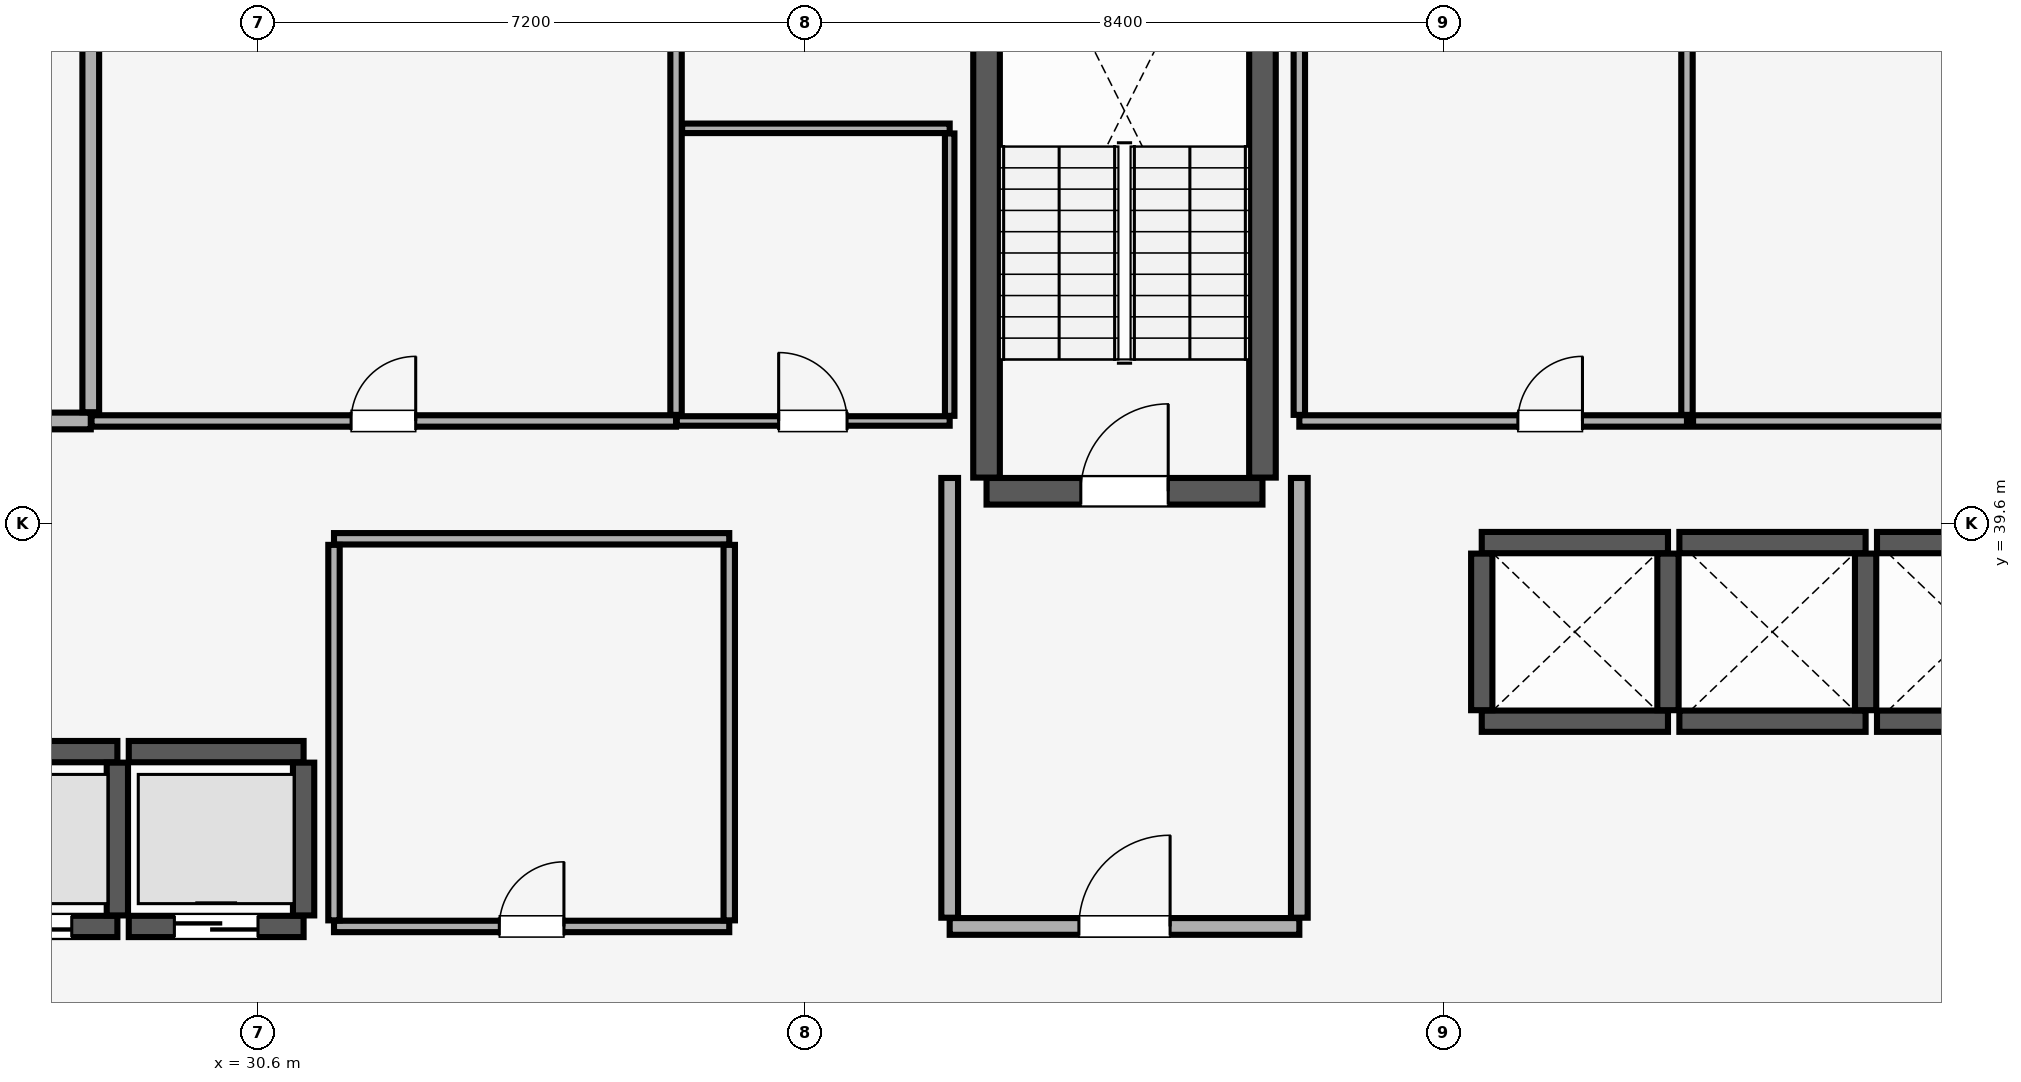
"""IFC4 building model, lengths in metres.
Left out: names, types, materials, properties, quantities, classifications, styles, units other than length and angle.
Written with IfcOpenShell. Run it as: python <this file> out.ifc"""

import sys

from ifc_helpers import new_model, si_unit, direction, frame, frame_2d, origin, place, context, subcontext, project, spatial, rectangle, extrude, element, fill, save


model = new_model("IFC4")
c1 = context("Model", 3, precision=1e-05, world=origin(), true_north=direction((0.0, 1.0)))
c2 = subcontext(c1, "Body", "Model", "MODEL_VIEW")
j1 = project(units=[si_unit("LENGTHUNIT", "METRE"), si_unit("PLANEANGLEUNIT", "RADIAN")], contexts=[c1])
p1 = place(None, origin())
s1 = spatial("IfcSite", under=j1, at=p1, CompositionType="ELEMENT")
p2 = place(p1, origin())
s2 = spatial("IfcBuilding", under=s1, at=p2, CompositionType="ELEMENT")
p3 = place(p2, frame((0.0, 0.0, 93.05)))
s3 = spatial("IfcBuildingStorey", under=s2, at=p3, CompositionType="ELEMENT", Elevation=93.05)
p4 = place(p3, frame((40.185, 40.025, 0.0), z_axis=(0.0, 0.0, 1.0), x_axis=(1.0, 0.0, 0.0)))
e1 = element("IfcWall", 1, at=p4, inside=s3, PredefinedType="SHEAR", context=c2, shape_type="SweptSolid", body=[
    extrude(rectangle(XDim=3.63, YDim=0.35, at=frame_2d((1.815, 0.0))), origin(), (0.0, 0.0, 1.0), 3.51),
])
p5 = place(p4, frame((1.24, 0.0, 0.0)))
e2 = element("IfcOpeningElement", 2, at=p5, cuts=e1, PredefinedType="OPENING", context=c2, shape_type="SweptSolid", body=[
    extrude(rectangle(XDim=1.15, YDim=2.15, at=frame_2d((0.575, 1.075))), frame((0.0, 0.185, 0.0), z_axis=(0.0, -1.0, 0.0), x_axis=(1.0, 0.0, 0.0)), (0.0, 0.0, 1.0), 0.37),
])
for number, where, z_axis, x_axis in (
    (3, (40.185, 40.205, 0.0), (0.0, 0.0, 1.0), (0.0, 1.0, 0.0)),
    (4, (43.815, 40.205, 0.0), (0.0, 0.0, 1.0), (0.0, 1.0, 0.0)),
):
    element("IfcWall", number, at=place(p3, frame(where, z_axis=z_axis, x_axis=x_axis)), inside=s3, PredefinedType="SHEAR", context=c2, shape_type="SweptSolid", body=[
        extrude(rectangle(XDim=8.09, YDim=0.35, at=frame_2d((4.045, 0.0))), origin(), (0.0, 0.0, 1.0), 3.51),
    ])
p6 = place(p3, frame((26.45, 34.3, 0.0), z_axis=(0.0, 0.0, 1.0), x_axis=(1.0, 0.0, 0.0)))
e5 = element("IfcWall", 5, at=p6, inside=s3, PredefinedType="SHEAR", context=c2, shape_type="SweptSolid", body=[
    extrude(rectangle(XDim=2.3, YDim=0.28, at=frame_2d((1.15, 0.0))), origin(), (0.0, 0.0, 1.0), 3.51),
])
p7 = place(p6, frame((0.6, 0.0, 0.0)))
e6 = element("IfcOpeningElement", 6, at=p7, cuts=e5, PredefinedType="OPENING", context=c2, shape_type="SweptSolid", body=[
    extrude(rectangle(XDim=1.1, YDim=2.2, at=frame_2d((0.55, 1.1))), frame((0.0, 0.15, 0.0), z_axis=(0.0, -1.0, 0.0), x_axis=(1.0, 0.0, 0.0)), (0.0, 0.0, 1.0), 0.3),
])
p8 = place(p3, frame((26.45, 36.6, 0.0), z_axis=(0.0, 0.0, 1.0), x_axis=(1.0, 0.0, 0.0)))
e7 = element("IfcWall", 7, at=p8, inside=s3, PredefinedType="SHEAR", context=c2, shape_type="SweptSolid", body=[
    extrude(rectangle(XDim=2.3, YDim=0.28, at=frame_2d((1.15, 0.0))), origin(), (0.0, 0.0, 1.0), 3.51),
])
p9 = place(p3, frame((28.75, 34.445, 0.0), z_axis=(0.0, 0.0, 1.0), x_axis=(0.0, 1.0, 0.0)))
e8 = element("IfcWall", 8, at=p9, inside=s3, PredefinedType="SHEAR", context=c2, shape_type="SweptSolid", body=[
    extrude(rectangle(XDim=2.01, YDim=0.28, at=frame_2d((1.005, 0.0))), origin(), (0.0, 0.0, 1.0), 3.51),
])
p10 = place(p3, frame((28.9, 34.3, 0.0), z_axis=(0.0, 0.0, 1.0), x_axis=(1.0, 0.0, 0.0)))
e9 = element("IfcWall", 9, at=p10, inside=s3, PredefinedType="SHEAR", context=c2, shape_type="SweptSolid", body=[
    extrude(rectangle(XDim=2.3, YDim=0.28, at=frame_2d((1.15, 0.0))), origin(), (0.0, 0.0, 1.0), 3.51),
])
p11 = place(p10, frame((0.6, 0.0, 0.0)))
e10 = element("IfcOpeningElement", 10, at=p11, cuts=e9, PredefinedType="OPENING", context=c2, shape_type="SweptSolid", body=[
    extrude(rectangle(XDim=1.1, YDim=2.2, at=frame_2d((0.55, 1.1))), frame((0.0, 0.15, 0.0), z_axis=(0.0, -1.0, 0.0), x_axis=(1.0, 0.0, 0.0)), (0.0, 0.0, 1.0), 0.3),
])
p12 = place(p3, frame((28.9, 36.6, 0.0), z_axis=(0.0, 0.0, 1.0), x_axis=(1.0, 0.0, 0.0)))
e11 = element("IfcWall", 11, at=p12, inside=s3, PredefinedType="SHEAR", context=c2, shape_type="SweptSolid", body=[
    extrude(rectangle(XDim=2.3, YDim=0.28, at=frame_2d((1.15, 0.0))), origin(), (0.0, 0.0, 1.0), 3.51),
])
p13 = place(p3, frame((31.2, 34.445, 0.0), z_axis=(0.0, 0.0, 1.0), x_axis=(0.0, 1.0, 0.0)))
e12 = element("IfcWall", 12, at=p13, inside=s3, PredefinedType="SHEAR", context=c2, shape_type="SweptSolid", body=[
    extrude(rectangle(XDim=2.01, YDim=0.28, at=frame_2d((1.005, 0.0))), origin(), (0.0, 0.0, 1.0), 3.51),
])
for number, where, z_axis, x_axis in (
    (13, (46.7, 37.0, 0.0), (0.0, 0.0, 1.0), (1.0, 0.0, 0.0)),
    (14, (46.7, 39.35, 0.0), (0.0, 0.0, 1.0), (1.0, 0.0, 0.0)),
):
    element("IfcWall", number, at=place(p3, frame(where, z_axis=z_axis, x_axis=x_axis)), inside=s3, PredefinedType="SHEAR", context=c2, shape_type="SweptSolid", body=[
        extrude(rectangle(XDim=2.45, YDim=0.28, at=frame_2d((1.225, 0.0))), origin(), (0.0, 0.0, 1.0), 3.51),
    ])
for number, where, z_axis, x_axis in (
    (15, (46.7, 37.145, 0.0), (0.0, 0.0, 1.0), (0.0, 1.0, 0.0)),
    (16, (49.15, 37.145, 0.0), (0.0, 0.0, 1.0), (0.0, 1.0, 0.0)),
):
    element("IfcWall", number, at=place(p3, frame(where, z_axis=z_axis, x_axis=x_axis)), inside=s3, PredefinedType="SHEAR", context=c2, shape_type="SweptSolid", body=[
        extrude(rectangle(XDim=2.06, YDim=0.28, at=frame_2d((1.03, 0.0))), origin(), (0.0, 0.0, 1.0), 3.51),
    ])
for number, where, z_axis, x_axis in (
    (17, (49.3, 37.0, 0.0), (0.0, 0.0, 1.0), (1.0, 0.0, 0.0)),
    (18, (49.3, 39.35, 0.0), (0.0, 0.0, 1.0), (1.0, 0.0, 0.0)),
):
    element("IfcWall", number, at=place(p3, frame(where, z_axis=z_axis, x_axis=x_axis)), inside=s3, PredefinedType="SHEAR", context=c2, shape_type="SweptSolid", body=[
        extrude(rectangle(XDim=2.45, YDim=0.28, at=frame_2d((1.225, 0.0))), origin(), (0.0, 0.0, 1.0), 3.51),
    ])
p14 = place(p3, frame((51.75, 37.145, 0.0), z_axis=(0.0, 0.0, 1.0), x_axis=(0.0, 1.0, 0.0)))
e19 = element("IfcWall", 19, at=p14, inside=s3, PredefinedType="SHEAR", context=c2, shape_type="SweptSolid", body=[
    extrude(rectangle(XDim=2.06, YDim=0.28, at=frame_2d((1.03, 0.0))), origin(), (0.0, 0.0, 1.0), 3.51),
])
for number, where, z_axis, x_axis in (
    (20, (51.9, 37.0, 0.0), (0.0, 0.0, 1.0), (1.0, 0.0, 0.0)),
    (21, (51.9, 39.35, 0.0), (0.0, 0.0, 1.0), (1.0, 0.0, 0.0)),
):
    element("IfcWall", number, at=place(p3, frame(where, z_axis=z_axis, x_axis=x_axis)), inside=s3, PredefinedType="SHEAR", context=c2, shape_type="SweptSolid", body=[
        extrude(rectangle(XDim=2.59, YDim=0.28, at=frame_2d((1.295, 0.0))), origin(), (0.0, 0.0, 1.0), 3.51),
    ])
p15 = place(p3, frame((39.7, 34.3, 0.0), z_axis=(0.0, 0.0, 1.0), x_axis=(1.0, 0.0, 0.0)))
e22 = element("IfcWall", 22, at=p15, inside=s3, PredefinedType="PARTITIONING", context=c2, shape_type="SweptSolid", body=[
    extrude(rectangle(XDim=4.6, YDim=0.22, at=frame_2d((2.3, 0.0))), origin(), (0.0, 0.0, 1.0), 3.51),
])
p16 = place(p15, frame((1.7, 0.0, 0.0)))
e23 = element("IfcOpeningElement", 23, at=p16, cuts=e22, PredefinedType="OPENING", context=c2, shape_type="SweptSolid", body=[
    extrude(rectangle(XDim=1.2, YDim=2.15, at=frame_2d((0.6, 1.075))), frame((0.0, 0.12, 0.0), z_axis=(0.0, -1.0, 0.0), x_axis=(1.0, 0.0, 0.0)), (0.0, 0.0, 1.0), 0.24),
])
for number, where, z_axis, x_axis in (
    (24, (39.7, 34.415, 0.0), (0.0, 0.0, 1.0), (0.0, 1.0, 0.0)),
    (25, (44.3, 34.415, 0.0), (0.0, 0.0, 1.0), (0.0, 1.0, 0.0)),
):
    element("IfcWall", number, at=place(p3, frame(where, z_axis=z_axis, x_axis=x_axis)), inside=s3, PredefinedType="PARTITIONING", context=c2, shape_type="SweptSolid", body=[
        extrude(rectangle(XDim=5.785, YDim=0.22, at=frame_2d((2.893, 0.0))), origin(), (0.0, 0.0, 1.0), 3.51),
    ])
p17 = place(p3, frame((31.6, 34.3, 0.0), z_axis=(0.0, 0.0, 1.0), x_axis=(1.0, 0.0, 0.0)))
e26 = element("IfcWall", 26, at=p17, inside=s3, PredefinedType="PARTITIONING", context=c2, shape_type="SweptSolid", body=[
    extrude(rectangle(XDim=5.2, YDim=0.15, at=frame_2d((2.6, 0.0))), origin(), (0.0, 0.0, 1.0), 3.51),
])
p18 = place(p17, frame((2.175, 0.0, 0.0)))
e27 = element("IfcOpeningElement", 27, at=p18, cuts=e26, PredefinedType="OPENING", context=c2, shape_type="SweptSolid", body=[
    extrude(rectangle(XDim=0.85, YDim=2.1, at=frame_2d((0.425, 1.05))), frame((0.0, 0.085, 0.0), z_axis=(0.0, -1.0, 0.0), x_axis=(1.0, 0.0, 0.0)), (0.0, 0.0, 1.0), 0.17),
])
p19 = place(p3, frame((31.6, 39.4, 0.0), z_axis=(0.0, 0.0, 1.0), x_axis=(1.0, 0.0, 0.0)))
e28 = element("IfcWall", 28, at=p19, inside=s3, PredefinedType="PARTITIONING", context=c2, shape_type="SweptSolid", body=[
    extrude(rectangle(XDim=5.2, YDim=0.15, at=frame_2d((2.6, 0.0))), origin(), (0.0, 0.0, 1.0), 3.51),
])
for number, where, z_axis, x_axis in (
    (29, (31.6, 34.38, 0.0), (0.0, 0.0, 1.0), (0.0, 1.0, 0.0)),
    (30, (36.8, 34.38, 0.0), (0.0, 0.0, 1.0), (0.0, 1.0, 0.0)),
):
    element("IfcWall", number, at=place(p3, frame(where, z_axis=z_axis, x_axis=x_axis)), inside=s3, PredefinedType="PARTITIONING", context=c2, shape_type="SweptSolid", body=[
        extrude(rectangle(XDim=4.94, YDim=0.15, at=frame_2d((2.47, 0.0))), origin(), (0.0, 0.0, 1.0), 3.51),
    ])
p20 = place(p3, frame((25.0, 40.95, 0.0), z_axis=(0.0, 0.0, 1.0), x_axis=(1.0, 0.0, 0.0)))
e31 = element("IfcWall", 31, at=p20, inside=s3, PredefinedType="PARTITIONING", context=c2, shape_type="SweptSolid", body=[
    extrude(rectangle(XDim=3.4, YDim=0.22, at=frame_2d((1.7, 0.0))), origin(), (0.0, 0.0, 1.0), 3.51),
])
p21 = place(p20, frame((1.275, 0.0, 0.0)))
e32 = element("IfcOpeningElement", 32, at=p21, cuts=e31, PredefinedType="OPENING", context=c2, shape_type="SweptSolid", body=[
    extrude(rectangle(XDim=0.85, YDim=2.1, at=frame_2d((0.425, 1.05))), frame((0.0, 0.12, 0.0), z_axis=(0.0, -1.0, 0.0), x_axis=(1.0, 0.0, 0.0)), (0.0, 0.0, 1.0), 0.24),
])
p22 = place(p3, frame((28.4, 41.065, 0.0), z_axis=(0.0, 0.0, 1.0), x_axis=(0.0, 1.0, 0.0)))
e33 = element("IfcWall", 33, at=p22, inside=s3, PredefinedType="PARTITIONING", context=c2, shape_type="SweptSolid", body=[
    extrude(rectangle(XDim=7.785, YDim=0.22, at=frame_2d((3.893, 0.0))), origin(), (0.0, 0.0, 1.0), 3.51),
])
p23 = place(p3, frame((28.41, 40.95, 0.0), z_axis=(0.0, 0.0, 1.0), x_axis=(1.0, 0.0, 0.0)))
e34 = element("IfcWall", 34, at=p23, inside=s3, PredefinedType="PARTITIONING", context=c2, shape_type="SweptSolid", body=[
    extrude(rectangle(XDim=7.69, YDim=0.15, at=frame_2d((3.845, 0.0))), origin(), (0.0, 0.0, 1.0), 3.51),
])
p24 = place(p23, frame((3.415, 0.0, 0.0)))
e35 = element("IfcOpeningElement", 35, at=p24, cuts=e34, PredefinedType="OPENING", context=c2, shape_type="SweptSolid", body=[
    extrude(rectangle(XDim=0.85, YDim=2.1, at=frame_2d((0.425, 1.05))), frame((0.0, 0.085, 0.0), z_axis=(0.0, -1.0, 0.0), x_axis=(1.0, 0.0, 0.0)), (0.0, 0.0, 1.0), 0.17),
])
p25 = place(p3, frame((36.1, 41.03, 0.0), z_axis=(0.0, 0.0, 1.0), x_axis=(0.0, 1.0, 0.0)))
e36 = element("IfcWall", 36, at=p25, inside=s3, PredefinedType="PARTITIONING", context=c2, shape_type="SweptSolid", body=[
    extrude(rectangle(XDim=7.82, YDim=0.15, at=frame_2d((3.91, 0.0))), origin(), (0.0, 0.0, 1.0), 3.51),
])
p26 = place(p3, frame((36.11, 40.95, 0.0), z_axis=(0.0, 0.0, 1.0), x_axis=(1.0, 0.0, 0.0)))
e37 = element("IfcWall", 37, at=p26, inside=s3, PredefinedType="PARTITIONING", context=c2, shape_type="SweptSolid", body=[
    extrude(rectangle(XDim=3.59, YDim=0.125, at=frame_2d((1.795, 0.0))), origin(), (0.0, 0.0, 1.0), 3.51),
])
p27 = place(p26, frame((1.34, 0.0, 0.0)))
e38 = element("IfcOpeningElement", 38, at=p27, cuts=e37, PredefinedType="OPENING", context=c2, shape_type="SweptSolid", body=[
    extrude(rectangle(XDim=0.9, YDim=2.1, at=frame_2d((0.45, 1.05))), frame((0.0, 0.073, 0.0), z_axis=(0.0, -1.0, 0.0), x_axis=(1.0, 0.0, 0.0)), (0.0, 0.0, 1.0), 0.145),
])
p28 = place(p3, frame((36.18, 44.8, 0.0), z_axis=(0.0, 0.0, 1.0), x_axis=(1.0, 0.0, 0.0)))
e39 = element("IfcWall", 39, at=p28, inside=s3, PredefinedType="PARTITIONING", context=c2, shape_type="SweptSolid", body=[
    extrude(rectangle(XDim=3.52, YDim=0.125, at=frame_2d((1.76, 0.0))), origin(), (0.0, 0.0, 1.0), 3.51),
])
p29 = place(p3, frame((39.7, 41.018, 0.0), z_axis=(0.0, 0.0, 1.0), x_axis=(0.0, 1.0, 0.0)))
e40 = element("IfcWall", 40, at=p29, inside=s3, PredefinedType="PARTITIONING", context=c2, shape_type="SweptSolid", body=[
    extrude(rectangle(XDim=3.715, YDim=0.125, at=frame_2d((1.857, 0.0))), origin(), (0.0, 0.0, 1.0), 3.51),
])
p30 = place(p3, frame((44.3, 40.95, 0.0), z_axis=(0.0, 0.0, 1.0), x_axis=(1.0, 0.0, 0.0)))
e41 = element("IfcWall", 41, at=p30, inside=s3, PredefinedType="PARTITIONING", context=c2, shape_type="SweptSolid", body=[
    extrude(rectangle(XDim=5.1, YDim=0.15, at=frame_2d((2.55, 0.0))), origin(), (0.0, 0.0, 1.0), 3.51),
])
p31 = place(p30, frame((2.875, 0.0, 0.0)))
e42 = element("IfcOpeningElement", 42, at=p31, cuts=e41, PredefinedType="OPENING", context=c2, shape_type="SweptSolid", body=[
    extrude(rectangle(XDim=0.85, YDim=2.1, at=frame_2d((0.425, 1.05))), frame((0.0, 0.085, 0.0), z_axis=(0.0, -1.0, 0.0), x_axis=(1.0, 0.0, 0.0)), (0.0, 0.0, 1.0), 0.17),
])
for number, where, z_axis, x_axis in (
    (43, (44.3, 41.03, 0.0), (0.0, 0.0, 1.0), (0.0, 1.0, 0.0)),
    (44, (49.4, 41.03, 0.0), (0.0, 0.0, 1.0), (0.0, 1.0, 0.0)),
):
    element("IfcWall", number, at=place(p3, frame(where, z_axis=z_axis, x_axis=x_axis)), inside=s3, PredefinedType="PARTITIONING", context=c2, shape_type="SweptSolid", body=[
        extrude(rectangle(XDim=7.82, YDim=0.15, at=frame_2d((3.91, 0.0))), origin(), (0.0, 0.0, 1.0), 3.51),
    ])
p32 = place(p3, frame((49.48, 40.95, 0.0), z_axis=(0.0, 0.0, 1.0), x_axis=(1.0, 0.0, 0.0)))
e45 = element("IfcWall", 45, at=p32, inside=s3, PredefinedType="PARTITIONING", context=c2, shape_type="SweptSolid", body=[
    extrude(rectangle(XDim=8.02, YDim=0.15, at=frame_2d((4.01, 0.0))), origin(), (0.0, 0.0, 1.0), 3.51),
])
p33 = place(p32, frame((4.72, 0.0, 0.0)))
e46 = element("IfcOpeningElement", 46, at=p33, cuts=e45, PredefinedType="OPENING", context=c2, shape_type="SweptSolid", body=[
    extrude(rectangle(XDim=1.0, YDim=2.15, at=frame_2d((0.5, 1.075))), frame((0.0, 0.085, 0.0), z_axis=(0.0, -1.0, 0.0), x_axis=(1.0, 0.0, 0.0)), (0.0, 0.0, 1.0), 0.17),
])
p34 = place(p5, origin())
e47 = element("IfcDoor", 47, at=p34, inside=s3, OperationType="SINGLE_SWING_RIGHT", PredefinedType="DOOR", context=c2, shape_type="SweptSolid", body=[
    extrude(rectangle(XDim=1.15, YDim=2.15, at=frame_2d((0.575, 1.075))), frame((0.0, 0.025, 0.0), z_axis=(0.0, -1.0, 0.0), x_axis=(1.0, 0.0, 0.0)), (0.0, 0.0, 1.0), 0.05),
])
fill(e2, e47)
p35 = place(p7, origin())
e48 = element("IfcDoor", 48, at=p35, inside=s3, OperationType="DOUBLE_DOOR_SLIDING", PredefinedType="DOOR", context=c2, shape_type="SweptSolid", body=[
    extrude(rectangle(XDim=1.1, YDim=2.2, at=frame_2d((0.55, 1.1))), frame((0.0, 0.025, 0.0), z_axis=(0.0, -1.0, 0.0), x_axis=(1.0, 0.0, 0.0)), (0.0, 0.0, 1.0), 0.05),
])
fill(e6, e48)
p36 = place(p11, origin())
e49 = element("IfcDoor", 49, at=p36, inside=s3, OperationType="DOUBLE_DOOR_SLIDING", PredefinedType="DOOR", context=c2, shape_type="SweptSolid", body=[
    extrude(rectangle(XDim=1.1, YDim=2.2, at=frame_2d((0.55, 1.1))), frame((0.0, 0.025, 0.0), z_axis=(0.0, -1.0, 0.0), x_axis=(1.0, 0.0, 0.0)), (0.0, 0.0, 1.0), 0.05),
])
fill(e10, e49)
p37 = place(p16, origin())
e50 = element("IfcDoor", 50, at=p37, inside=s3, OperationType="SINGLE_SWING_RIGHT", PredefinedType="DOOR", context=c2, shape_type="SweptSolid", body=[
    extrude(rectangle(XDim=1.2, YDim=2.15, at=frame_2d((0.6, 1.075))), frame((0.0, 0.025, 0.0), z_axis=(0.0, -1.0, 0.0), x_axis=(1.0, 0.0, 0.0)), (0.0, 0.0, 1.0), 0.05),
])
fill(e23, e50)
p38 = place(p18, origin())
e51 = element("IfcDoor", 51, at=p38, inside=s3, OperationType="SINGLE_SWING_RIGHT", PredefinedType="DOOR", context=c2, shape_type="SweptSolid", body=[
    extrude(rectangle(XDim=0.85, YDim=2.1, at=frame_2d((0.425, 1.05))), frame((0.0, 0.025, 0.0), z_axis=(0.0, -1.0, 0.0), x_axis=(1.0, 0.0, 0.0)), (0.0, 0.0, 1.0), 0.05),
])
fill(e27, e51)
p39 = place(p24, origin())
e52 = element("IfcDoor", 52, at=p39, inside=s3, OperationType="SINGLE_SWING_RIGHT", PredefinedType="DOOR", context=c2, shape_type="SweptSolid", body=[
    extrude(rectangle(XDim=0.85, YDim=2.1, at=frame_2d((0.425, 1.05))), frame((0.0, 0.025, 0.0), z_axis=(0.0, -1.0, 0.0), x_axis=(1.0, 0.0, 0.0)), (0.0, 0.0, 1.0), 0.05),
])
fill(e35, e52)
p40 = place(p27, origin())
e53 = element("IfcDoor", 53, at=p40, inside=s3, OperationType="SINGLE_SWING_LEFT", PredefinedType="DOOR", context=c2, shape_type="SweptSolid", body=[
    extrude(rectangle(XDim=0.9, YDim=2.1, at=frame_2d((0.45, 1.05))), frame((0.0, 0.025, 0.0), z_axis=(0.0, -1.0, 0.0), x_axis=(1.0, 0.0, 0.0)), (0.0, 0.0, 1.0), 0.05),
])
fill(e38, e53)
p41 = place(p31, origin())
e54 = element("IfcDoor", 54, at=p41, inside=s3, OperationType="SINGLE_SWING_RIGHT", PredefinedType="DOOR", context=c2, shape_type="SweptSolid", body=[
    extrude(rectangle(XDim=0.85, YDim=2.1, at=frame_2d((0.425, 1.05))), frame((0.0, 0.025, 0.0), z_axis=(0.0, -1.0, 0.0), x_axis=(1.0, 0.0, 0.0)), (0.0, 0.0, 1.0), 0.05),
])
fill(e42, e54)
save(model, sys.argv[1])
